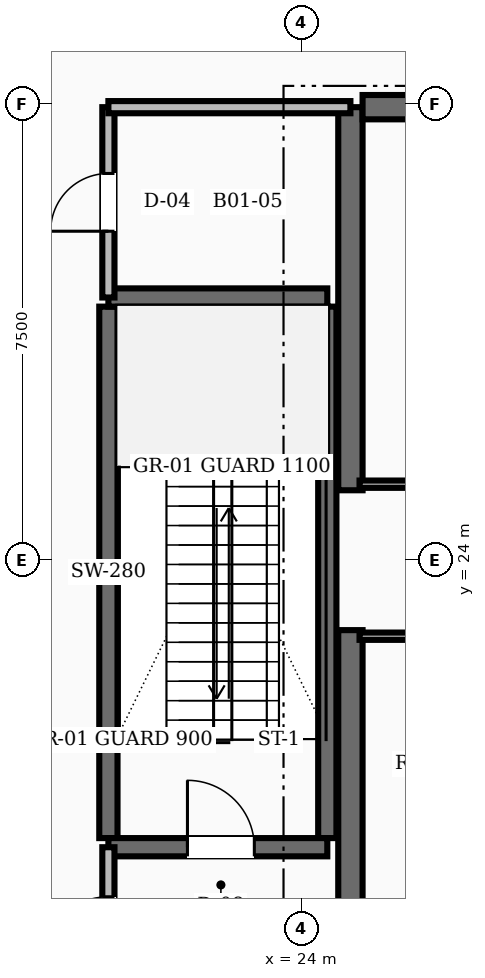
"""IFC4 building model, lengths in metres.
Left out: names, types, materials, properties, quantities, classifications, styles, units other than length and angle.
Written with IfcOpenShell. Run it as: python <this file> out.ifc"""

import sys

from ifc_helpers import new_model, si_unit, direction, frame, frame_2d, origin, place, context, subcontext, project, spatial, rectangle, extrude, element, fill, save


model = new_model("IFC4")
c1 = context("Model", 3, precision=1e-05, world=origin(), true_north=direction((0.0, 1.0)))
c2 = subcontext(c1, "Body", "Model", "MODEL_VIEW")
j1 = project(units=[si_unit("LENGTHUNIT", "METRE"), si_unit("PLANEANGLEUNIT", "RADIAN")], contexts=[c1])
p1 = place(None, origin())
s1 = spatial("IfcSite", under=j1, at=p1, CompositionType="ELEMENT")
p2 = place(p1, origin())
s2 = spatial("IfcBuilding", under=s1, at=p2, CompositionType="ELEMENT")
p3 = place(p2, frame((0.0, 0.0, -5.2)))
s3 = spatial("IfcBuildingStorey", under=s2, at=p3, CompositionType="ELEMENT", Elevation=-5.2)
for number, where, z_axis, x_axis in (
    (1, (24.8, 16.55, 0.0), (0.0, 0.0, 1.0), (0.0, 1.0, 0.0)),
    (2, (24.8, 25.15, 0.0), (0.0, 0.0, 1.0), (0.0, 1.0, 0.0)),
):
    element("IfcWall", number, at=place(p3, frame(where, z_axis=z_axis, x_axis=x_axis)), inside=s3, PredefinedType="SHEAR", context=c2, shape_type="SweptSolid", body=[
        extrude(rectangle(XDim=6.3, YDim=0.4, at=frame_2d((3.15, 0.0))), origin(), (0.0, 0.0, 1.0), 5.2),
    ])
p4 = place(p3, frame((25.0, 31.45, 0.0), z_axis=(0.0, 0.0, 1.0), x_axis=(1.0, 0.0, 0.0)))
e3 = element("IfcWall", 3, at=p4, inside=s3, PredefinedType="SHEAR", context=c2, shape_type="SweptSolid", body=[
    extrude(rectangle(XDim=3.2, YDim=0.4, at=frame_2d((1.6, 0.0))), origin(), (0.0, 0.0, 1.0), 5.2),
])
for number, where, z_axis, x_axis in (
    (4, (20.82, 19.43, 0.0), (0.0, 0.0, 1.0), (0.0, 1.0, 0.0)),
    (5, (24.42, 19.43, 0.0), (0.0, 0.0, 1.0), (0.0, 1.0, 0.0)),
):
    element("IfcWall", number, at=place(p3, frame(where, z_axis=z_axis, x_axis=x_axis)), inside=s3, PredefinedType="SHEAR", context=c2, shape_type="SweptSolid", body=[
        extrude(rectangle(XDim=8.74, YDim=0.3, at=frame_2d((4.37, 0.0))), origin(), (0.0, 0.0, 1.0), 5.2),
    ])
p5 = place(p3, frame((20.82, 19.28, 0.0), z_axis=(0.0, 0.0, 1.0), x_axis=(1.0, 0.0, 0.0)))
e6 = element("IfcWall", 6, at=p5, inside=s3, PredefinedType="SHEAR", context=c2, shape_type="SweptSolid", body=[
    extrude(rectangle(XDim=3.6, YDim=0.3, at=frame_2d((1.8, 0.0))), origin(), (0.0, 0.0, 1.0), 5.2),
])
p6 = place(p5, frame((1.3, 0.0, 0.0)))
e7 = element("IfcOpeningElement", 7, at=p6, cuts=e6, PredefinedType="OPENING", context=c2, shape_type="SweptSolid", body=[
    extrude(rectangle(XDim=1.1, YDim=2.1, at=frame_2d((0.55, 1.05))), frame((0.0, 0.16, 0.0), z_axis=(0.0, -1.0, 0.0), x_axis=(1.0, 0.0, 0.0)), (0.0, 0.0, 1.0), 0.32),
])
p7 = place(p3, frame((20.82, 28.32, 0.0), z_axis=(0.0, 0.0, 1.0), x_axis=(1.0, 0.0, 0.0)))
e8 = element("IfcWall", 8, at=p7, inside=s3, PredefinedType="SHEAR", context=c2, shape_type="SweptSolid", body=[
    extrude(rectangle(XDim=3.6, YDim=0.3, at=frame_2d((1.8, 0.0))), origin(), (0.0, 0.0, 1.0), 5.2),
])
p8 = place(p3, frame((20.82, 16.55, 0.0), z_axis=(0.0, 0.0, 1.0), x_axis=(0.0, 1.0, 0.0)))
e9 = element("IfcWall", 9, at=p8, inside=s3, PredefinedType="SOLIDWALL", context=c2, shape_type="SweptSolid", body=[
    extrude(rectangle(XDim=2.73, YDim=0.2, at=frame_2d((1.365, 0.0))), origin(), (0.0, 0.0, 1.0), 3.92),
])
p9 = place(p8, frame((0.815, 0.0, 0.0)))
e10 = element("IfcOpeningElement", 10, at=p9, cuts=e9, PredefinedType="OPENING", context=c2, shape_type="SweptSolid", body=[
    extrude(rectangle(XDim=1.1, YDim=2.1, at=frame_2d((0.55, 1.05))), frame((0.0, 0.11, 0.0), z_axis=(0.0, -1.0, 0.0), x_axis=(1.0, 0.0, 0.0)), (0.0, 0.0, 1.0), 0.22),
])
p10 = place(p3, frame((20.82, 28.32, 0.0), z_axis=(0.0, 0.0, 1.0), x_axis=(0.0, 1.0, 0.0)))
e11 = element("IfcWall", 11, at=p10, inside=s3, PredefinedType="SOLIDWALL", context=c2, shape_type="SweptSolid", body=[
    extrude(rectangle(XDim=3.13, YDim=0.2, at=frame_2d((1.565, 0.0))), origin(), (0.0, 0.0, 1.0), 3.92),
])
p11 = place(p10, frame((1.09, 0.0, 0.0)))
e12 = element("IfcOpeningElement", 12, at=p11, cuts=e11, PredefinedType="OPENING", context=c2, shape_type="SweptSolid", body=[
    extrude(rectangle(XDim=0.95, YDim=2.1, at=frame_2d((0.475, 1.05))), frame((0.0, 0.11, 0.0), z_axis=(0.0, -1.0, 0.0), x_axis=(1.0, 0.0, 0.0)), (0.0, 0.0, 1.0), 0.22),
])
p12 = place(p3, frame((20.82, 31.45, 0.0), z_axis=(0.0, 0.0, 1.0), x_axis=(1.0, 0.0, 0.0)))
e13 = element("IfcWall", 13, at=p12, inside=s3, PredefinedType="SOLIDWALL", context=c2, shape_type="SweptSolid", body=[
    extrude(rectangle(XDim=3.98, YDim=0.2, at=frame_2d((1.99, 0.0))), origin(), (0.0, 0.0, 1.0), 3.92),
])
p13 = place(p3, frame((24.95, 25.25, 0.0), z_axis=(0.0, 0.0, 1.0), x_axis=(1.0, 0.0, 0.0)))
e14 = element("IfcWall", 14, at=p13, inside=s3, PredefinedType="PARTITIONING", context=c2, shape_type="SweptSolid", body=[
    extrude(rectangle(XDim=3.2, YDim=0.12, at=frame_2d((1.6, 0.0))), origin(), (0.0, 0.0, 1.0), 3.92),
])
p14 = place(p13, frame((1.125, 0.0, 0.0)))
e15 = element("IfcOpeningElement", 15, at=p14, cuts=e14, PredefinedType="OPENING", context=c2, shape_type="SweptSolid", body=[
    extrude(rectangle(XDim=0.95, YDim=2.1, at=frame_2d((0.475, 1.05))), frame((0.0, 0.07, 0.0), z_axis=(0.0, -1.0, 0.0), x_axis=(1.0, 0.0, 0.0)), (0.0, 0.0, 1.0), 0.14),
])
p15 = place(p3, frame((24.95, 22.75, 0.0), z_axis=(0.0, 0.0, 1.0), x_axis=(1.0, 0.0, 0.0)))
e16 = element("IfcWall", 16, at=p15, inside=s3, PredefinedType="PARTITIONING", context=c2, shape_type="SweptSolid", body=[
    extrude(rectangle(XDim=3.2, YDim=0.12, at=frame_2d((1.6, 0.0))), origin(), (0.0, 0.0, 1.0), 3.92),
])
p16 = place(p15, frame((1.125, 0.0, 0.0)))
e17 = element("IfcOpeningElement", 17, at=p16, cuts=e16, PredefinedType="OPENING", context=c2, shape_type="SweptSolid", body=[
    extrude(rectangle(XDim=0.95, YDim=2.1, at=frame_2d((0.475, 1.05))), frame((0.0, 0.07, 0.0), z_axis=(0.0, -1.0, 0.0), x_axis=(1.0, 0.0, 0.0)), (0.0, 0.0, 1.0), 0.14),
])
p17 = place(p6, origin())
e18 = element("IfcDoor", 18, at=p17, inside=s3, OperationType="SINGLE_SWING_LEFT", PredefinedType="DOOR", context=c2, shape_type="SweptSolid", body=[
    extrude(rectangle(XDim=1.1, YDim=2.1, at=frame_2d((0.55, 1.05))), frame((0.0, 0.025, 0.0), z_axis=(0.0, -1.0, 0.0), x_axis=(1.0, 0.0, 0.0)), (0.0, 0.0, 1.0), 0.05),
])
fill(e7, e18)
p18 = place(p9, origin())
e19 = element("IfcDoor", 19, at=p18, inside=s3, OperationType="SINGLE_SWING_LEFT", PredefinedType="DOOR", context=c2, shape_type="SweptSolid", body=[
    extrude(rectangle(XDim=1.1, YDim=2.1, at=frame_2d((0.55, 1.05))), frame((0.0, 0.025, 0.0), z_axis=(0.0, -1.0, 0.0), x_axis=(1.0, 0.0, 0.0)), (0.0, 0.0, 1.0), 0.05),
])
fill(e10, e19)
p19 = place(p11, origin())
e20 = element("IfcDoor", 20, at=p19, inside=s3, OperationType="SINGLE_SWING_LEFT", PredefinedType="DOOR", context=c2, shape_type="SweptSolid", body=[
    extrude(rectangle(XDim=0.95, YDim=2.1, at=frame_2d((0.475, 1.05))), frame((0.0, 0.025, 0.0), z_axis=(0.0, -1.0, 0.0), x_axis=(1.0, 0.0, 0.0)), (0.0, 0.0, 1.0), 0.05),
])
fill(e12, e20)
save(model, sys.argv[1])
